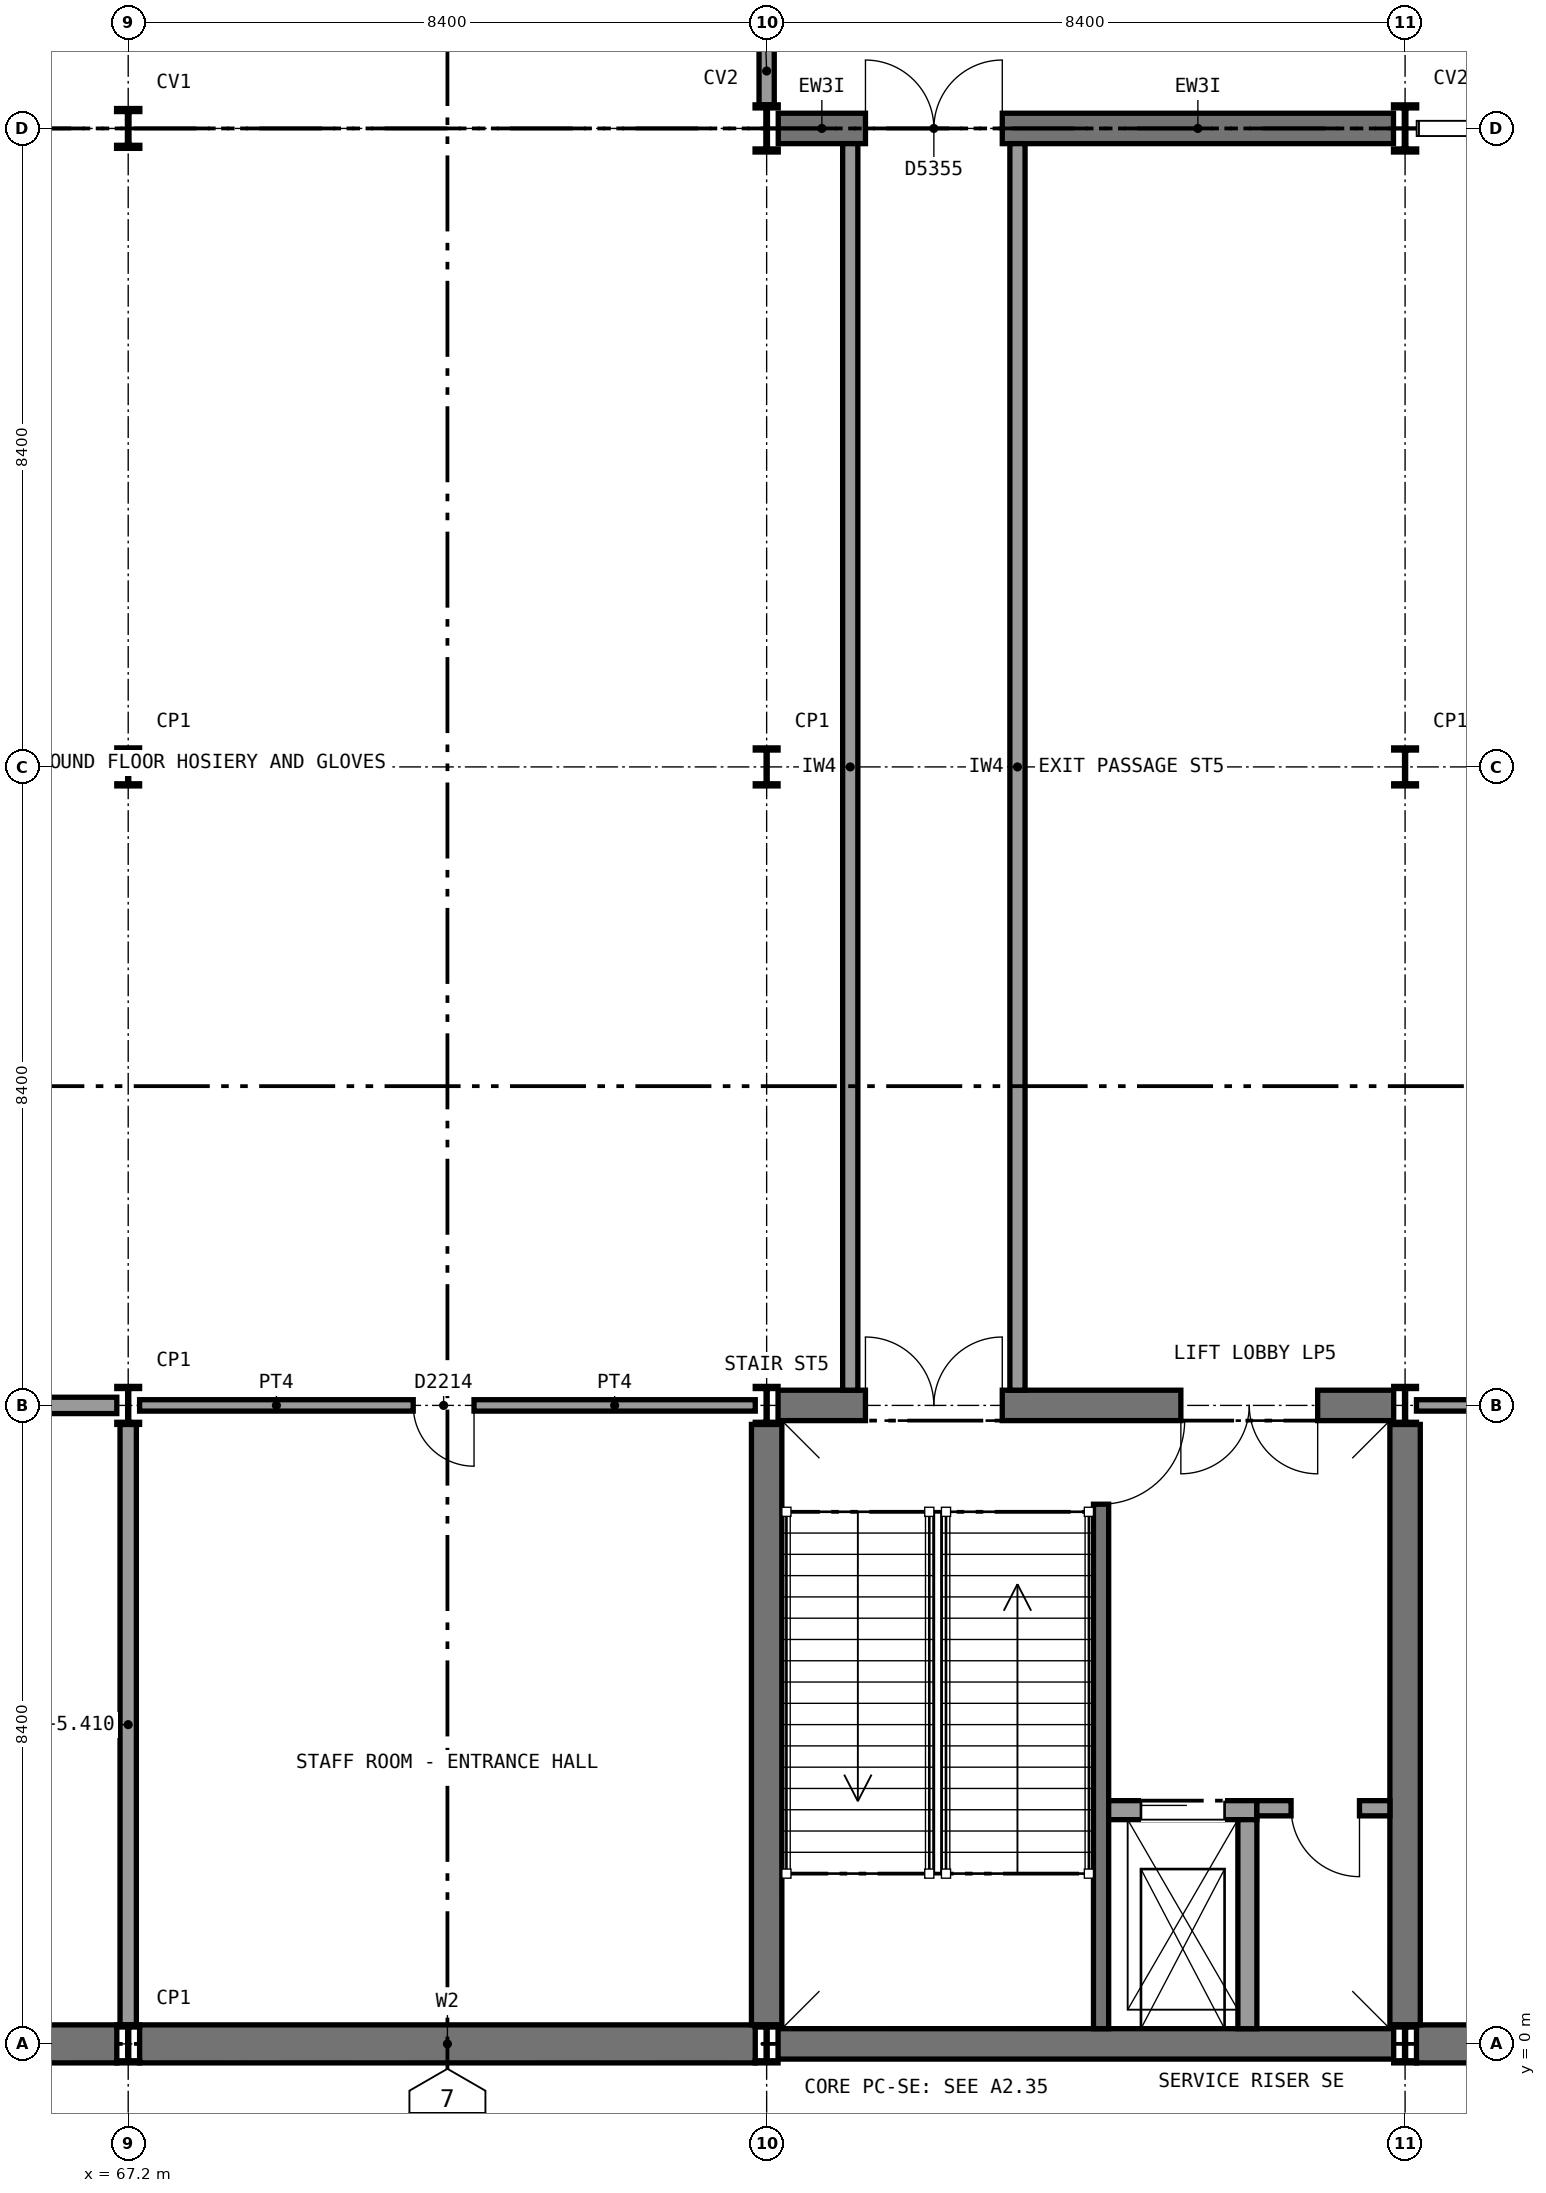
"""IFC4 building model, lengths in metres.
Left out: names, types, materials, properties, quantities, classifications, styles, units other than length and angle.
Written with IfcOpenShell. Run it as: python <this file> out.ifc"""

import sys

from ifc_helpers import new_model, si_unit, direction, frame, frame_2d, origin, origin_2d, place, context, subcontext, project, spatial, rectangle, i_section, extrude, element, fill, save


model = new_model("IFC4")
c1 = context("Model", 3, precision=1e-05, world=origin(), true_north=direction((0.0, 1.0)))
c2 = subcontext(c1, "Body", "Model", "MODEL_VIEW")
j1 = project(units=[si_unit("LENGTHUNIT", "METRE"), si_unit("PLANEANGLEUNIT", "RADIAN")], contexts=[c1])
p1 = place(None, origin())
s1 = spatial("IfcSite", under=j1, at=p1, CompositionType="ELEMENT")
p2 = place(p1, origin())
s2 = spatial("IfcBuilding", under=s1, at=p2, CompositionType="ELEMENT")
p3 = place(p2, origin())
s3 = spatial("IfcBuildingStorey", under=s2, at=p3, CompositionType="ELEMENT", Elevation=0.0)
p4 = place(p3, frame((58.95, 0.0, 0.0), z_axis=(0.0, 0.0, 1.0), x_axis=(1.0, 0.0, 0.0)))
e1 = element("IfcWall", 1, at=p4, inside=s3, PredefinedType="SHEAR", context=c2, shape_type="SweptSolid", body=[
    extrude(rectangle(XDim=8.1, YDim=0.5, at=frame_2d((4.05, 0.0))), origin(), (0.0, 0.0, 1.0), 5.85),
])
p5 = place(p3, frame((67.35, 0.0, 0.0), z_axis=(0.0, 0.0, 1.0), x_axis=(1.0, 0.0, 0.0)))
e2 = element("IfcWall", 2, at=p5, inside=s3, PredefinedType="SHEAR", context=c2, shape_type="SweptSolid", body=[
    extrude(rectangle(XDim=8.1, YDim=0.5, at=frame_2d((4.05, 0.0))), origin(), (0.0, 0.0, 1.0), 5.85),
])
p6 = place(p3, frame((84.15, 0.0, 0.0), z_axis=(0.0, 0.0, 1.0), x_axis=(1.0, 0.0, 0.0)))
e3 = element("IfcWall", 3, at=p6, inside=s3, PredefinedType="SHEAR", context=c2, shape_type="SweptSolid", body=[
    extrude(rectangle(XDim=8.1, YDim=0.5, at=frame_2d((4.05, 0.0))), origin(), (0.0, 0.0, 1.0), 5.85),
])
p7 = place(p3, frame((75.75, 0.0, 0.0), z_axis=(0.0, 0.0, 1.0), x_axis=(1.0, 0.0, 0.0)))
e4 = element("IfcWall", 4, at=p7, inside=s3, PredefinedType="SHEAR", context=c2, shape_type="SweptSolid", body=[
    extrude(rectangle(XDim=8.1, YDim=0.4, at=frame_2d((4.05, 0.0))), origin(), (0.0, 0.0, 1.0), 5.85),
])
p8 = place(p3, frame((75.75, 8.4, 0.0), z_axis=(0.0, 0.0, 1.0), x_axis=(1.0, 0.0, 0.0)))
e5 = element("IfcWall", 5, at=p8, inside=s3, PredefinedType="SHEAR", context=c2, shape_type="SweptSolid", body=[
    extrude(rectangle(XDim=8.1, YDim=0.4, at=frame_2d((4.05, 0.0))), origin(), (0.0, 0.0, 1.0), 5.85),
])
p9 = place(p8, frame((5.3, 0.0, 0.0)))
e6 = element("IfcOpeningElement", 6, at=p9, cuts=e5, PredefinedType="OPENING", context=c2, shape_type="SweptSolid", body=[
    extrude(rectangle(XDim=1.8, YDim=2.1, at=frame_2d((0.9, 1.05))), frame((0.0, 0.21, 0.0), z_axis=(0.0, -1.0, 0.0), x_axis=(1.0, 0.0, 0.0)), (0.0, 0.0, 1.0), 0.42),
])
p10 = place(p8, frame((1.15, 0.0, 0.0)))
e7 = element("IfcOpeningElement", 7, at=p10, cuts=e5, PredefinedType="OPENING", context=c2, shape_type="SweptSolid", body=[
    extrude(rectangle(XDim=1.8, YDim=2.1, at=frame_2d((0.9, 1.05))), frame((0.0, 0.21, 0.0), z_axis=(0.0, -1.0, 0.0), x_axis=(1.0, 0.0, 0.0)), (0.0, 0.0, 1.0), 0.42),
])
for number, where, z_axis, x_axis in (
    (8, (75.6, 0.25, 0.0), (0.0, 0.0, 1.0), (0.0, 1.0, 0.0)),
    (9, (84.0, 0.25, 0.0), (0.0, 0.0, 1.0), (0.0, 1.0, 0.0)),
):
    element("IfcWall", number, at=place(p3, frame(where, z_axis=z_axis, x_axis=x_axis)), inside=s3, PredefinedType="SHEAR", context=c2, shape_type="SweptSolid", body=[
        extrude(rectangle(XDim=7.9, YDim=0.4, at=frame_2d((3.95, 0.0))), origin(), (0.0, 0.0, 1.0), 5.85),
    ])
for number, where, z_axis, x_axis in (
    (10, (67.2, 0.0, 0.0), (0.0, 0.0, 1.0), (1.0, 0.0, 0.0)),
    (11, (67.2, 8.4, 0.0), (0.0, 0.0, 1.0), (1.0, 0.0, 0.0)),
    (12, (67.2, 16.8, 0.0), (0.0, 0.0, 1.0), (1.0, 0.0, 0.0)),
):
    element("IfcColumn", number, at=place(p3, frame(where, z_axis=z_axis, x_axis=x_axis)), inside=s3, PredefinedType="COLUMN", context=c2, shape_type="SweptSolid", body=[
        extrude(i_section(OverallWidth=0.3, OverallDepth=0.5, WebThickness=0.014, FlangeThickness=0.028, FilletRadius=0.027, at=origin_2d()), origin(), (0.0, 0.0, 1.0), 6.0),
    ])
p11 = place(p3, frame((67.2, 25.2, 0.0), z_axis=(0.0, 0.0, 1.0), x_axis=(1.0, 0.0, 0.0)))
e13 = element("IfcColumn", 13, at=p11, inside=s3, PredefinedType="COLUMN", context=c2, shape_type="SweptSolid", body=[
    extrude(i_section(OverallWidth=0.306, OverallDepth=0.524, WebThickness=0.021, FlangeThickness=0.04, FilletRadius=0.027, at=origin_2d()), origin(), (0.0, 0.0, 1.0), 6.0),
])
for number, where, z_axis, x_axis in (
    (14, (75.6, 0.0, 0.0), (0.0, 0.0, 1.0), (1.0, 0.0, 0.0)),
    (15, (75.6, 8.4, 0.0), (0.0, 0.0, 1.0), (1.0, 0.0, 0.0)),
    (16, (75.6, 16.8, 0.0), (0.0, 0.0, 1.0), (1.0, 0.0, 0.0)),
):
    element("IfcColumn", number, at=place(p3, frame(where, z_axis=z_axis, x_axis=x_axis)), inside=s3, PredefinedType="COLUMN", context=c2, shape_type="SweptSolid", body=[
        extrude(i_section(OverallWidth=0.3, OverallDepth=0.5, WebThickness=0.014, FlangeThickness=0.028, FilletRadius=0.027, at=origin_2d()), origin(), (0.0, 0.0, 1.0), 6.0),
    ])
p12 = place(p3, frame((75.6, 25.2, 0.0), z_axis=(0.0, 0.0, 1.0), x_axis=(1.0, 0.0, 0.0)))
e17 = element("IfcColumn", 17, at=p12, inside=s3, PredefinedType="COLUMN", context=c2, shape_type="SweptSolid", body=[
    extrude(i_section(OverallWidth=0.305, OverallDepth=0.62, WebThickness=0.021, FlangeThickness=0.04, FilletRadius=0.027, at=origin_2d()), origin(), (0.0, 0.0, 1.0), 6.0),
])
for number, where, z_axis, x_axis in (
    (18, (84.0, 0.0, 0.0), (0.0, 0.0, 1.0), (1.0, 0.0, 0.0)),
    (19, (84.0, 8.4, 0.0), (0.0, 0.0, 1.0), (1.0, 0.0, 0.0)),
    (20, (84.0, 16.8, 0.0), (0.0, 0.0, 1.0), (1.0, 0.0, 0.0)),
):
    element("IfcColumn", number, at=place(p3, frame(where, z_axis=z_axis, x_axis=x_axis)), inside=s3, PredefinedType="COLUMN", context=c2, shape_type="SweptSolid", body=[
        extrude(i_section(OverallWidth=0.3, OverallDepth=0.5, WebThickness=0.014, FlangeThickness=0.028, FilletRadius=0.027, at=origin_2d()), origin(), (0.0, 0.0, 1.0), 6.0),
    ])
p13 = place(p3, frame((84.0, 25.2, 0.0), z_axis=(0.0, 0.0, 1.0), x_axis=(1.0, 0.0, 0.0)))
e21 = element("IfcColumn", 21, at=p13, inside=s3, PredefinedType="COLUMN", context=c2, shape_type="SweptSolid", body=[
    extrude(i_section(OverallWidth=0.305, OverallDepth=0.62, WebThickness=0.021, FlangeThickness=0.04, FilletRadius=0.027, at=origin_2d()), origin(), (0.0, 0.0, 1.0), 6.0),
])
p14 = place(p3, frame((67.2, 0.25, 0.0), z_axis=(0.0, 0.0, 1.0), x_axis=(0.0, 1.0, 0.0)))
e22 = element("IfcWall", 22, at=p14, inside=s3, PredefinedType="SOLIDWALL", context=c2, shape_type="SweptSolid", body=[
    extrude(rectangle(XDim=7.9, YDim=0.215, at=frame_2d((3.95, 0.0))), origin(), (0.0, 0.0, 1.0), 5.41),
])
p15 = place(p3, frame((58.95, 8.4, 0.0), z_axis=(0.0, 0.0, 1.0), x_axis=(1.0, 0.0, 0.0)))
e23 = element("IfcWall", 23, at=p15, inside=s3, PredefinedType="SOLIDWALL", context=c2, shape_type="SweptSolid", body=[
    extrude(rectangle(XDim=8.1, YDim=0.215, at=frame_2d((4.05, 0.0))), origin(), (0.0, 0.0, 1.0), 5.52),
])
p16 = place(p15, frame((3.6, 0.0, 0.0)))
e24 = element("IfcOpeningElement", 24, at=p16, cuts=e23, PredefinedType="OPENING", context=c2, shape_type="SweptSolid", body=[
    extrude(rectangle(XDim=1.0, YDim=2.1, at=frame_2d((0.5, 1.05))), frame((0.0, 0.118, 0.0), z_axis=(0.0, -1.0, 0.0), x_axis=(1.0, 0.0, 0.0)), (0.0, 0.0, 1.0), 0.235),
])
p17 = place(p3, frame((67.35, 8.4, 0.0), z_axis=(0.0, 0.0, 1.0), x_axis=(1.0, 0.0, 0.0)))
e25 = element("IfcWall", 25, at=p17, inside=s3, PredefinedType="SOLIDWALL", context=c2, shape_type="SweptSolid", body=[
    extrude(rectangle(XDim=8.1, YDim=0.15, at=frame_2d((4.05, 0.0))), origin(), (0.0, 0.0, 1.0), 5.52),
])
p18 = place(p17, frame((3.6, 0.0, 0.0)))
e26 = element("IfcOpeningElement", 26, at=p18, cuts=e25, PredefinedType="OPENING", context=c2, shape_type="SweptSolid", body=[
    extrude(rectangle(XDim=0.8, YDim=2.1, at=frame_2d((0.4, 1.05))), frame((0.0, 0.085, 0.0), z_axis=(0.0, -1.0, 0.0), x_axis=(1.0, 0.0, 0.0)), (0.0, 0.0, 1.0), 0.17),
])
p19 = place(p3, frame((84.15, 8.4, 0.0), z_axis=(0.0, 0.0, 1.0), x_axis=(1.0, 0.0, 0.0)))
e27 = element("IfcWall", 27, at=p19, inside=s3, PredefinedType="SOLIDWALL", context=c2, shape_type="SweptSolid", body=[
    extrude(rectangle(XDim=8.1, YDim=0.15, at=frame_2d((4.05, 0.0))), origin(), (0.0, 0.0, 1.0), 5.52),
])
p20 = place(p19, frame((3.35, 0.0, 0.0)))
e28 = element("IfcOpeningElement", 28, at=p20, cuts=e27, PredefinedType="OPENING", context=c2, shape_type="SweptSolid", body=[
    extrude(rectangle(XDim=1.5, YDim=2.1, at=frame_2d((0.75, 1.05))), frame((0.0, 0.085, 0.0), z_axis=(0.0, -1.0, 0.0), x_axis=(1.0, 0.0, 0.0)), (0.0, 0.0, 1.0), 0.17),
])
p21 = place(p3, frame((75.6, 25.51, 0.0), z_axis=(0.0, 0.0, 1.0), x_axis=(0.0, 1.0, 0.0)))
e29 = element("IfcWall", 29, at=p21, inside=s3, PredefinedType="STANDARD", context=c2, shape_type="SweptSolid", body=[
    extrude(rectangle(XDim=11.98, YDim=0.2, at=frame_2d((5.99, 0.0))), origin(), (0.0, 0.0, 1.0), 5.16),
])
p22 = place(p21, frame((0.89, 0.0, 0.0)))
e30 = element("IfcOpeningElement", 30, at=p22, cuts=e29, PredefinedType="OPENING", context=c2, shape_type="SweptSolid", body=[
    extrude(rectangle(XDim=1.8, YDim=3.0, at=frame_2d((0.9, 1.5))), frame((0.0, 0.11, 0.0), z_axis=(0.0, -1.0, 0.0), x_axis=(1.0, 0.0, 0.0)), (0.0, 0.0, 1.0), 0.22),
])
p23 = place(p21, frame((5.09, 0.0, 0.0)))
e31 = element("IfcOpeningElement", 31, at=p23, cuts=e29, PredefinedType="OPENING", context=c2, shape_type="SweptSolid", body=[
    extrude(rectangle(XDim=1.8, YDim=3.0, at=frame_2d((0.9, 1.5))), frame((0.0, 0.11, 0.0), z_axis=(0.0, -1.0, 0.0), x_axis=(1.0, 0.0, 0.0)), (0.0, 0.0, 1.0), 0.22),
])
p24 = place(p21, frame((9.29, 0.0, 0.0)))
e32 = element("IfcOpeningElement", 32, at=p24, cuts=e29, PredefinedType="OPENING", context=c2, shape_type="SweptSolid", body=[
    extrude(rectangle(XDim=1.8, YDim=3.0, at=frame_2d((0.9, 1.5))), frame((0.0, 0.11, 0.0), z_axis=(0.0, -1.0, 0.0), x_axis=(1.0, 0.0, 0.0)), (0.0, 0.0, 1.0), 0.22),
])
p25 = place(p3, frame((75.753, 25.2, 0.0), z_axis=(0.0, 0.0, 1.0), x_axis=(1.0, 0.0, 0.0)))
e33 = element("IfcWall", 33, at=p25, inside=s3, PredefinedType="STANDARD", context=c2, shape_type="SweptSolid", body=[
    extrude(rectangle(XDim=8.095, YDim=0.4, at=frame_2d((4.047, 0.0))), origin(), (0.0, 0.0, 1.0), 5.85),
])
p26 = place(p25, frame((1.147, 0.0, 0.0)))
e34 = element("IfcOpeningElement", 34, at=p26, cuts=e33, PredefinedType="OPENING", context=c2, shape_type="SweptSolid", body=[
    extrude(rectangle(XDim=1.8, YDim=2.1, at=frame_2d((0.9, 1.05))), frame((0.0, 0.21, 0.0), z_axis=(0.0, -1.0, 0.0), x_axis=(1.0, 0.0, 0.0)), (0.0, 0.0, 1.0), 0.42),
])
p27 = place(p3, frame((80.0, 0.2, 0.0), z_axis=(0.0, 0.0, 1.0), x_axis=(0.0, 1.0, 0.0)))
e35 = element("IfcWall", 35, at=p27, inside=s3, PredefinedType="SHEAR", context=c2, shape_type="SweptSolid", body=[
    extrude(rectangle(XDim=8.0, YDim=0.2, at=frame_2d((4.0, 0.0))), origin(), (0.0, 0.0, 1.0), 5.85),
])
p28 = place(p27, frame((6.9, 0.0, 0.0)))
e36 = element("IfcOpeningElement", 36, at=p28, cuts=e35, PredefinedType="OPENING", context=c2, shape_type="SweptSolid", body=[
    extrude(rectangle(XDim=1.11, YDim=2.1, at=frame_2d((0.555, 1.05))), frame((0.0, 0.11, 0.0), z_axis=(0.0, -1.0, 0.0), x_axis=(1.0, 0.0, 0.0)), (0.0, 0.0, 1.0), 0.22),
])
p29 = place(p3, frame((80.1, 3.075, 0.0), z_axis=(0.0, 0.0, 1.0), x_axis=(1.0, 0.0, 0.0)))
e37 = element("IfcWall", 37, at=p29, inside=s3, PredefinedType="SOLIDWALL", context=c2, shape_type="SweptSolid", body=[
    extrude(rectangle(XDim=1.95, YDim=0.25, at=frame_2d((0.975, 0.0))), origin(), (0.0, 0.0, 1.0), 6.0),
])
p30 = place(p29, frame((0.425, 0.0, 0.0)))
e38 = element("IfcOpeningElement", 38, at=p30, cuts=e37, PredefinedType="OPENING", context=c2, shape_type="SweptSolid", body=[
    extrude(rectangle(XDim=1.1, YDim=2.1, at=frame_2d((0.55, 1.05))), frame((0.0, 0.135, 0.0), z_axis=(0.0, -1.0, 0.0), x_axis=(1.0, 0.0, 0.0)), (0.0, 0.0, 1.0), 0.27),
])
p31 = place(p3, frame((81.925, 0.2, 0.0), z_axis=(0.0, 0.0, 1.0), x_axis=(0.0, 1.0, 0.0)))
e39 = element("IfcWall", 39, at=p31, inside=s3, PredefinedType="SOLIDWALL", context=c2, shape_type="SweptSolid", body=[
    extrude(rectangle(XDim=2.75, YDim=0.25, at=frame_2d((1.375, 0.0))), origin(), (0.0, 0.0, 1.0), 6.0),
])
p32 = place(p3, frame((82.05, 3.1, 0.0), z_axis=(0.0, 0.0, 1.0), x_axis=(1.0, 0.0, 0.0)))
e40 = element("IfcWall", 40, at=p32, inside=s3, PredefinedType="PARTITIONING", context=c2, shape_type="SweptSolid", body=[
    extrude(rectangle(XDim=1.75, YDim=0.2, at=frame_2d((0.875, 0.0))), origin(), (0.0, 0.0, 1.0), 5.85),
])
p33 = place(p32, frame((0.45, 0.0, 0.0)))
e41 = element("IfcOpeningElement", 41, at=p33, cuts=e40, PredefinedType="OPENING", context=c2, shape_type="SweptSolid", body=[
    extrude(rectangle(XDim=0.9, YDim=2.1, at=frame_2d((0.45, 1.05))), frame((0.0, 0.11, 0.0), z_axis=(0.0, -1.0, 0.0), x_axis=(1.0, 0.0, 0.0)), (0.0, 0.0, 1.0), 0.22),
])
for number, where, z_axis, x_axis in (
    (42, (76.7, 8.6, 0.0), (0.0, 0.0, 1.0), (0.0, 1.0, 0.0)),
    (43, (78.9, 8.6, 0.0), (0.0, 0.0, 1.0), (0.0, 1.0, 0.0)),
):
    element("IfcWall", number, at=place(p3, frame(where, z_axis=z_axis, x_axis=x_axis)), inside=s3, PredefinedType="PARTITIONING", context=c2, shape_type="SweptSolid", body=[
        extrude(rectangle(XDim=16.4, YDim=0.2, at=frame_2d((8.2, 0.0))), origin(), (0.0, 0.0, 1.0), 5.85),
    ])
p34 = place(p18, frame((0.8, 0.0, 0.0), z_axis=(0.0, 0.0, 1.0), x_axis=(-1.0, 0.0, 0.0)))
e44 = element("IfcDoor", 44, at=p34, inside=s3, OperationType="SINGLE_SWING_LEFT", PredefinedType="DOOR", context=c2, shape_type="SweptSolid", body=[
    extrude(rectangle(XDim=0.8, YDim=2.1, at=frame_2d((0.4, 1.05))), frame((0.0, 0.025, 0.0), z_axis=(0.0, -1.0, 0.0), x_axis=(1.0, 0.0, 0.0)), (0.0, 0.0, 1.0), 0.05),
])
fill(e26, e44)
p35 = place(p28, frame((1.1, 0.0, 0.0), z_axis=(0.0, 0.0, 1.0), x_axis=(-1.0, 0.0, 0.0)))
e45 = element("IfcDoor", 45, at=p35, inside=s3, OperationType="SINGLE_SWING_LEFT", PredefinedType="DOOR", context=c2, shape_type="SweptSolid", body=[
    extrude(rectangle(XDim=1.1, YDim=2.1, at=frame_2d((0.55, 1.05))), frame((0.0, 0.025, 0.0), z_axis=(0.0, -1.0, 0.0), x_axis=(1.0, 0.0, 0.0)), (0.0, 0.0, 1.0), 0.05),
])
fill(e36, e45)
p36 = place(p30, origin())
e46 = element("IfcDoor", 46, at=p36, inside=s3, OperationType="SLIDING_TO_LEFT", PredefinedType="DOOR", context=c2, shape_type="SweptSolid", body=[
    extrude(rectangle(XDim=1.1, YDim=2.1, at=frame_2d((0.55, 1.05))), frame((0.0, 0.025, 0.0), z_axis=(0.0, -1.0, 0.0), x_axis=(1.0, 0.0, 0.0)), (0.0, 0.0, 1.0), 0.05),
])
fill(e38, e46)
p37 = place(p33, frame((0.9, 0.0, 0.0), z_axis=(0.0, 0.0, 1.0), x_axis=(-1.0, 0.0, 0.0)))
e47 = element("IfcDoor", 47, at=p37, inside=s3, OperationType="SINGLE_SWING_LEFT", PredefinedType="DOOR", context=c2, shape_type="SweptSolid", body=[
    extrude(rectangle(XDim=0.9, YDim=2.1, at=frame_2d((0.45, 1.05))), frame((0.0, 0.025, 0.0), z_axis=(0.0, -1.0, 0.0), x_axis=(1.0, 0.0, 0.0)), (0.0, 0.0, 1.0), 0.05),
])
fill(e41, e47)
p38 = place(p9, frame((1.8, 0.0, 0.0), z_axis=(0.0, 0.0, 1.0), x_axis=(-1.0, 0.0, 0.0)))
e48 = element("IfcDoor", 48, at=p38, inside=s3, OperationType="DOUBLE_DOOR_SINGLE_SWING", PredefinedType="DOOR", context=c2, shape_type="SweptSolid", body=[
    extrude(rectangle(XDim=1.8, YDim=2.1, at=frame_2d((0.9, 1.05))), frame((0.0, 0.025, 0.0), z_axis=(0.0, -1.0, 0.0), x_axis=(1.0, 0.0, 0.0)), (0.0, 0.0, 1.0), 0.05),
])
fill(e6, e48)
p39 = place(p10, origin())
e49 = element("IfcDoor", 49, at=p39, inside=s3, OperationType="DOUBLE_DOOR_SINGLE_SWING", PredefinedType="DOOR", context=c2, shape_type="SweptSolid", body=[
    extrude(rectangle(XDim=1.8, YDim=2.1, at=frame_2d((0.9, 1.05))), frame((0.0, 0.025, 0.0), z_axis=(0.0, -1.0, 0.0), x_axis=(1.0, 0.0, 0.0)), (0.0, 0.0, 1.0), 0.05),
])
fill(e7, e49)
p40 = place(p26, origin())
e50 = element("IfcDoor", 50, at=p40, inside=s3, OperationType="DOUBLE_DOOR_SINGLE_SWING", PredefinedType="DOOR", context=c2, shape_type="SweptSolid", body=[
    extrude(rectangle(XDim=1.8, YDim=2.1, at=frame_2d((0.9, 1.05))), frame((0.0, 0.025, 0.0), z_axis=(0.0, -1.0, 0.0), x_axis=(1.0, 0.0, 0.0)), (0.0, 0.0, 1.0), 0.05),
])
fill(e34, e50)
save(model, sys.argv[1])
